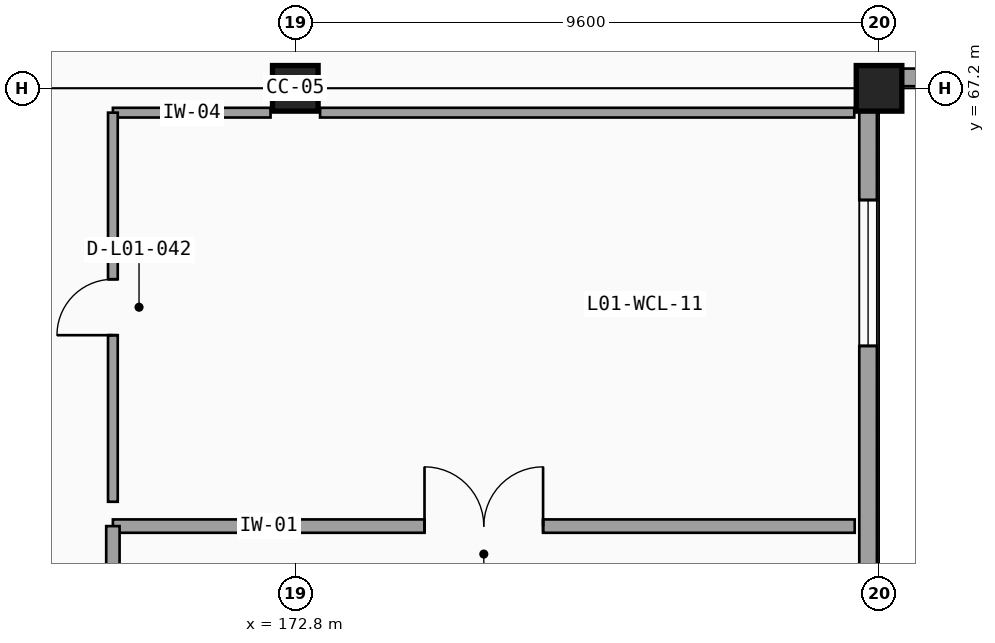
"""IFC4 building model, lengths in metres.
Left out: names, types, materials, properties, quantities, classifications, styles, units other than length and angle.
Written with IfcOpenShell. Run it as: python <this file> out.ifc"""

import sys

from ifc_helpers import new_model, si_unit, direction, frame, frame_2d, origin, origin_2d, place, context, subcontext, project, spatial, rectangle, extrude, element, fill, save


model = new_model("IFC4")
c1 = context("Model", 3, precision=1e-05, world=origin(), true_north=direction((0.0, 1.0)))
c2 = subcontext(c1, "Body", "Model", "MODEL_VIEW")
j1 = project(units=[si_unit("LENGTHUNIT", "METRE"), si_unit("PLANEANGLEUNIT", "RADIAN")], contexts=[c1])
p1 = place(None, origin())
s1 = spatial("IfcSite", under=j1, at=p1, CompositionType="ELEMENT")
p2 = place(p1, origin())
s2 = spatial("IfcBuilding", under=s1, at=p2, CompositionType="ELEMENT")
p3 = place(p2, frame((0.0, 0.0, 4.8)))
s3 = spatial("IfcBuildingStorey", under=s2, at=p3, CompositionType="ELEMENT", Elevation=4.8)
for number, where, z_axis, x_axis in (
    (1, (172.8, 67.2, 0.0), (0.0, 0.0, 1.0), (1.0, 0.0, 0.0)),
    (2, (182.4, 67.2, 0.0), (0.0, 0.0, 1.0), (1.0, 0.0, 0.0)),
):
    element("IfcColumn", number, at=place(p3, frame(where, z_axis=z_axis, x_axis=x_axis)), inside=s3, PredefinedType="COLUMN", context=c2, shape_type="SweptSolid", body=[
        extrude(rectangle(XDim=0.75, YDim=0.75, at=origin_2d()), origin(), (0.0, 0.0, 1.0), 4.8),
    ])
p4 = place(p3, frame((182.22, 57.6, 0.0), z_axis=(0.0, 0.0, 1.0), x_axis=(0.0, 1.0, 0.0)))
e3 = element("IfcWall", 3, at=p4, inside=s3, PredefinedType="SOLIDWALL", context=c2, shape_type="SweptSolid", body=[
    extrude(rectangle(XDim=9.245, YDim=0.29, at=frame_2d((4.623, 0.0))), origin(), (0.0, 0.0, 1.0), 3.913),
])
p5 = place(p4, frame((7.763, 0.0, 0.95), z_axis=(0.0, 0.0, 1.0), x_axis=(-1.0, 0.0, 0.0)))
e4 = element("IfcOpeningElement", 4, at=p5, cuts=e3, PredefinedType="OPENING", context=c2, shape_type="SweptSolid", body=[
    extrude(rectangle(XDim=2.4, YDim=2.2, at=frame_2d((1.2, 1.1))), frame((0.0, 0.155, 0.0), z_axis=(0.0, -1.0, 0.0), x_axis=(1.0, 0.0, 0.0)), (0.0, 0.0, 1.0), 0.31),
])
p6 = place(p3, frame((182.755, 67.38, 0.0), z_axis=(0.0, 0.0, 1.0), x_axis=(1.0, 0.0, 0.0)))
e5 = element("IfcWall", 5, at=p6, inside=s3, PredefinedType="SOLIDWALL", context=c2, shape_type="SweptSolid", body=[
    extrude(rectangle(XDim=8.89, YDim=0.29, at=frame_2d((4.445, 0.0))), origin(), (0.0, 0.0, 1.0), 3.758),
])
p7 = place(p6, frame((3.763, 0.0, 0.95), z_axis=(0.0, 0.0, 1.0), x_axis=(-1.0, 0.0, 0.0)))
e6 = element("IfcOpeningElement", 6, at=p7, cuts=e5, PredefinedType="OPENING", context=c2, shape_type="SweptSolid", body=[
    extrude(rectangle(XDim=2.4, YDim=2.2, at=frame_2d((1.2, 1.1))), frame((0.0, 0.155, 0.0), z_axis=(0.0, -1.0, 0.0), x_axis=(1.0, 0.0, 0.0)), (0.0, 0.0, 1.0), 0.31),
])
p8 = place(p6, frame((7.527, 0.0, 0.95), z_axis=(0.0, 0.0, 1.0), x_axis=(-1.0, 0.0, 0.0)))
e7 = element("IfcOpeningElement", 7, at=p8, cuts=e5, PredefinedType="OPENING", context=c2, shape_type="SweptSolid", body=[
    extrude(rectangle(XDim=2.4, YDim=2.2, at=frame_2d((1.2, 1.1))), frame((0.0, 0.155, 0.0), z_axis=(0.0, -1.0, 0.0), x_axis=(1.0, 0.0, 0.0)), (0.0, 0.0, 1.0), 0.31),
])
p9 = place(p3, frame((169.8, 60.0, 0.0), z_axis=(0.0, 0.0, 1.0), x_axis=(1.0, 0.0, 0.0)))
e8 = element("IfcWall", 8, at=p9, inside=s3, PredefinedType="PARTITIONING", context=c2, shape_type="SweptSolid", body=[
    extrude(rectangle(XDim=12.2, YDim=0.22, at=frame_2d((6.1, 0.0))), origin(), (0.0, 0.0, 1.0), 3.913),
])
p10 = place(p9, frame((5.125, 0.0, 0.0), z_axis=(0.0, 0.0, 1.0), x_axis=(1.0, 0.0, 0.0)))
e9 = element("IfcOpeningElement", 9, at=p10, cuts=e8, PredefinedType="OPENING", context=c2, shape_type="SweptSolid", body=[
    extrude(rectangle(XDim=1.95, YDim=2.35, at=frame_2d((0.975, 1.175))), frame((0.0, 0.12, 0.0), z_axis=(0.0, -1.0, 0.0), x_axis=(1.0, 0.0, 0.0)), (0.0, 0.0, 1.0), 0.24),
])
p11 = place(p3, frame((169.8, 48.5, 0.0), z_axis=(0.0, 0.0, 1.0), x_axis=(0.0, 1.0, 0.0)))
e10 = element("IfcWall", 10, at=p11, inside=s3, PredefinedType="PARTITIONING", context=c2, shape_type="SweptSolid", body=[
    extrude(rectangle(XDim=11.5, YDim=0.22, at=frame_2d((5.75, 0.0))), origin(), (0.0, 0.0, 1.0), 3.758),
])
p12 = place(p3, frame((169.8, 66.8, 0.0), z_axis=(0.0, 0.0, 1.0), x_axis=(1.0, 0.0, 0.0)))
e11 = element("IfcWall", 11, at=p12, inside=s3, PredefinedType="PARTITIONING", context=c2, shape_type="SweptSolid", body=[
    extrude(rectangle(XDim=2.593, YDim=0.16, at=frame_2d((1.296, 0.0))), origin(), (0.0, 0.0, 1.0), 4.52),
])
p13 = place(p3, frame((173.207, 66.8, 0.0), z_axis=(0.0, 0.0, 1.0), x_axis=(1.0, 0.0, 0.0)))
e12 = element("IfcWall", 12, at=p13, inside=s3, PredefinedType="PARTITIONING", context=c2, shape_type="SweptSolid", body=[
    extrude(rectangle(XDim=8.785, YDim=0.16, at=frame_2d((4.393, 0.0))), origin(), (0.0, 0.0, 1.0), 4.52),
])
p14 = place(p3, frame((169.8, 60.4, 0.0), z_axis=(0.0, 0.0, 1.0), x_axis=(0.0, 1.0, 0.0)))
e13 = element("IfcWall", 13, at=p14, inside=s3, PredefinedType="PARTITIONING", context=c2, shape_type="SweptSolid", body=[
    extrude(rectangle(XDim=6.4, YDim=0.16, at=frame_2d((3.2, 0.0))), origin(), (0.0, 0.0, 1.0), 4.063),
])
p15 = place(p14, frame((2.74, 0.0, 0.0), z_axis=(0.0, 0.0, 1.0), x_axis=(1.0, 0.0, 0.0)))
e14 = element("IfcOpeningElement", 14, at=p15, cuts=e13, PredefinedType="OPENING", context=c2, shape_type="SweptSolid", body=[
    extrude(rectangle(XDim=0.92, YDim=2.12, at=frame_2d((0.46, 1.06))), frame((0.0, 0.09, 0.0), z_axis=(0.0, -1.0, 0.0), x_axis=(1.0, 0.0, 0.0)), (0.0, 0.0, 1.0), 0.18),
])
p16 = place(p5, origin())
e15 = element("IfcWindow", 15, at=p16, inside=s3, PartitioningType="SINGLE_PANEL", PredefinedType="WINDOW", context=c2, shape_type="SweptSolid", body=[
    extrude(rectangle(XDim=2.4, YDim=2.2, at=frame_2d((1.2, 1.1))), frame((0.0, 0.03, 0.0), z_axis=(0.0, -1.0, 0.0), x_axis=(1.0, 0.0, 0.0)), (0.0, 0.0, 1.0), 0.06),
])
fill(e4, e15)
p17 = place(p10, origin())
e16 = element("IfcDoor", 16, at=p17, inside=s3, OperationType="DOUBLE_DOOR_SINGLE_SWING", PredefinedType="DOOR", context=c2, shape_type="SweptSolid", body=[
    extrude(rectangle(XDim=1.95, YDim=2.35, at=frame_2d((0.975, 1.175))), frame((0.0, 0.025, 0.0), z_axis=(0.0, -1.0, 0.0), x_axis=(1.0, 0.0, 0.0)), (0.0, 0.0, 1.0), 0.05),
])
fill(e9, e16)
p18 = place(p15, origin())
e17 = element("IfcDoor", 17, at=p18, inside=s3, OperationType="SINGLE_SWING_LEFT", PredefinedType="DOOR", context=c2, shape_type="SweptSolid", body=[
    extrude(rectangle(XDim=0.92, YDim=2.12, at=frame_2d((0.46, 1.06))), frame((0.0, 0.025, 0.0), z_axis=(0.0, -1.0, 0.0), x_axis=(1.0, 0.0, 0.0)), (0.0, 0.0, 1.0), 0.05),
])
fill(e14, e17)
save(model, sys.argv[1])
